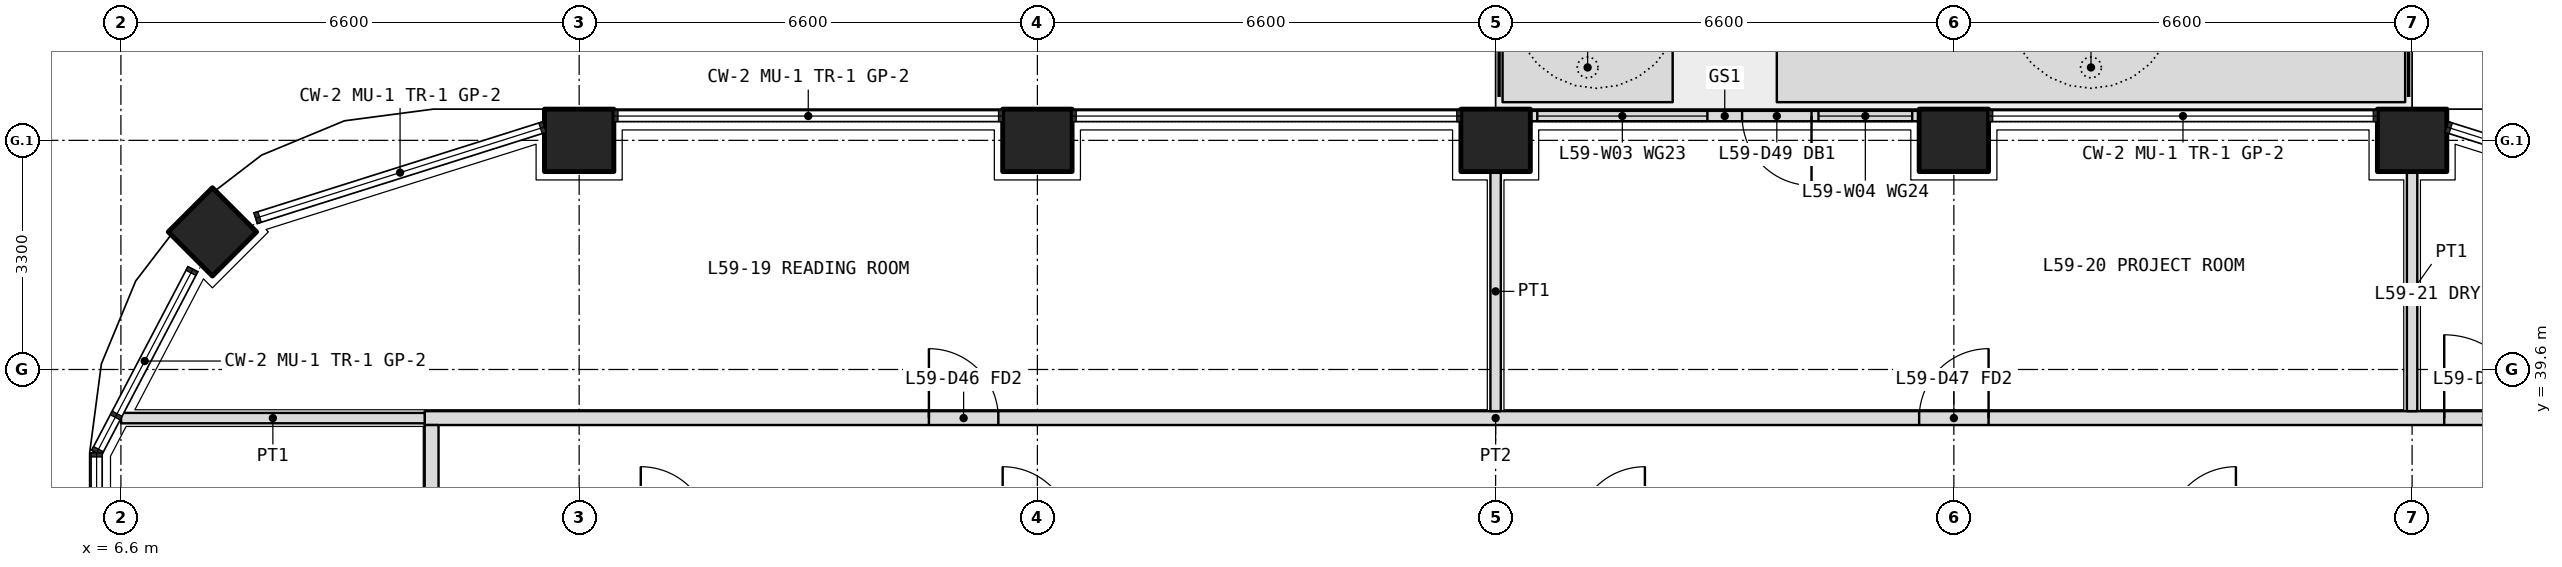
"""IFC4 building model, lengths in metres.
Left out: names, types, materials, properties, quantities, classifications, styles, units other than length and angle.
Written with IfcOpenShell. Run it as: python <this file> out.ifc"""

import sys

from ifc_helpers import new_model, si_unit, direction, frame, frame_2d, origin, origin_2d, place, context, subcontext, project, spatial, polyline, rectangle, outline, extrude, element, fill, save


model = new_model("IFC4")
c1 = context("Model", 3, precision=1e-05, world=origin(), true_north=direction((0.0, 1.0)))
c2 = subcontext(c1, "Body", "Model", "MODEL_VIEW")
j1 = project(units=[si_unit("LENGTHUNIT", "METRE"), si_unit("PLANEANGLEUNIT", "RADIAN")], contexts=[c1])
p1 = place(None, origin())
s1 = spatial("IfcSite", under=j1, at=p1, CompositionType="ELEMENT")
p2 = place(p1, origin())
s2 = spatial("IfcBuilding", under=s1, at=p2, CompositionType="ELEMENT")
p3 = place(p2, frame((0.0, 0.0, 258.6)))
s3 = spatial("IfcBuildingStorey", under=s2, at=p3, CompositionType="ELEMENT", Elevation=258.6)
p4 = place(p3, frame((7.918, 41.582, 0.0), z_axis=(0.0, 0.0, 1.0), x_axis=(0.707106781187, 0.707106781187, 0.0)))
e1 = element("IfcColumn", 1, at=p4, inside=s3, PredefinedType="COLUMN", context=c2, shape_type="SweptSolid", body=[
    extrude(rectangle(XDim=0.9, YDim=0.9, at=origin_2d()), origin(), (0.0, 0.0, 1.0), 4.2),
])
for number, where, z_axis, x_axis in (
    (2, (13.2, 42.9, 0.0), (0.0, 0.0, 1.0), (1.0, 0.0, 0.0)),
    (3, (19.8, 42.9, 0.0), (0.0, 0.0, 1.0), (1.0, 0.0, 0.0)),
    (4, (26.4, 42.9, 0.0), (0.0, 0.0, 1.0), (1.0, 0.0, 0.0)),
    (5, (33.0, 42.9, 0.0), (0.0, 0.0, 1.0), (1.0, 0.0, 0.0)),
    (6, (39.6, 42.9, 0.0), (0.0, 0.0, 1.0), (1.0, 0.0, 0.0)),
):
    element("IfcColumn", number, at=place(p3, frame(where, z_axis=z_axis, x_axis=x_axis)), inside=s3, PredefinedType="COLUMN", context=c2, shape_type="SweptSolid", body=[
        extrude(rectangle(XDim=1.0, YDim=0.9, at=origin_2d()), origin(), (0.0, 0.0, 1.0), 4.2),
    ])
p5 = place(p3, origin())
e7 = element("IfcWall", 7, at=p5, inside=s3, PredefinedType="USERDEFINED", context=c2, shape_type="SweptSolid", body=[
    extrude(outline(polyline([(26.5, 43.45), (28.95, 43.45), (28.95, 44.45), (26.5, 44.45), (26.5, 43.45)]), holes=[polyline([(26.65, 43.6), (28.8, 43.6), (28.8, 44.3), (26.65, 44.3), (26.65, 43.6)])]), origin(), (0.0, 0.0, 1.0), 1.05),
])
p6 = place(p3, origin())
e8 = element("IfcWall", 8, at=p6, inside=s3, PredefinedType="USERDEFINED", context=c2, shape_type="SweptSolid", body=[
    extrude(outline(polyline([(30.45, 43.45), (39.5, 43.45), (39.5, 44.45), (30.45, 44.45), (30.45, 43.45)]), holes=[polyline([(30.6, 43.6), (39.35, 43.6), (39.35, 44.3), (30.6, 44.3), (30.6, 43.6)])]), origin(), (0.0, 0.0, 1.0), 1.05),
])
p7 = place(p3, frame((32.5, 43.25, 0.0), z_axis=(0.0, 0.0, 1.0), x_axis=(-1.0, 0.0, 0.0)))
e9 = element("IfcWall", 9, at=p7, inside=s3, PredefinedType="SOLIDWALL", context=c2, shape_type="SweptSolid", body=[
    extrude(rectangle(XDim=5.6, YDim=0.15, at=frame_2d((2.8, 0.0))), origin(), (0.0, 0.0, 1.0), 2.7),
])
p8 = place(p7, frame((1.55, 0.0, 0.0)))
e10 = element("IfcOpeningElement", 10, at=p8, cuts=e9, PredefinedType="OPENING", context=c2, shape_type="SweptSolid", body=[
    extrude(rectangle(XDim=1.0, YDim=2.4, at=frame_2d((0.5, 1.2))), frame((0.0, 0.085, 0.0), z_axis=(0.0, -1.0, 0.0), x_axis=(1.0, 0.0, 0.0)), (0.0, 0.0, 1.0), 0.17),
])
p9 = place(p7, frame((0.1, 0.0, 0.1)))
e11 = element("IfcOpeningElement", 11, at=p9, cuts=e9, PredefinedType="OPENING", context=c2, shape_type="SweptSolid", body=[
    extrude(rectangle(XDim=1.35, YDim=2.3, at=frame_2d((0.675, 1.15))), frame((0.0, 0.085, 0.0), z_axis=(0.0, -1.0, 0.0), x_axis=(1.0, 0.0, 0.0)), (0.0, 0.0, 1.0), 0.17),
])
p10 = place(p7, frame((3.05, 0.0, 0.1)))
e12 = element("IfcOpeningElement", 12, at=p10, cuts=e9, PredefinedType="OPENING", context=c2, shape_type="SweptSolid", body=[
    extrude(rectangle(XDim=2.45, YDim=2.3, at=frame_2d((1.225, 1.15))), frame((0.0, 0.085, 0.0), z_axis=(0.0, -1.0, 0.0), x_axis=(1.0, 0.0, 0.0)), (0.0, 0.0, 1.0), 0.17),
])
p11 = place(p3, frame((10.975, 38.9, 0.0), z_axis=(0.0, 0.0, 1.0), x_axis=(1.0, 0.0, 0.0)))
e13 = element("IfcWall", 13, at=p11, inside=s3, PredefinedType="PARTITIONING", context=c2, shape_type="SweptSolid", body=[
    extrude(rectangle(XDim=30.85, YDim=0.2, at=frame_2d((15.425, 0.0))), origin(), (0.0, 0.0, 1.0), 3.0),
])
p12 = place(p11, frame((7.262, 0.0, 0.0)))
e14 = element("IfcOpeningElement", 14, at=p12, cuts=e13, PredefinedType="OPENING", context=c2, shape_type="SweptSolid", body=[
    extrude(rectangle(XDim=1.0, YDim=2.1, at=frame_2d((0.5, 1.05))), frame((0.0, 0.11, 0.0), z_axis=(0.0, -1.0, 0.0), x_axis=(1.0, 0.0, 0.0)), (0.0, 0.0, 1.0), 0.22),
])
p13 = place(p11, frame((21.525, 0.0, 0.0)))
e15 = element("IfcOpeningElement", 15, at=p13, cuts=e13, PredefinedType="OPENING", context=c2, shape_type="SweptSolid", body=[
    extrude(rectangle(XDim=1.0, YDim=2.1, at=frame_2d((0.5, 1.05))), frame((0.0, 0.11, 0.0), z_axis=(0.0, -1.0, 0.0), x_axis=(1.0, 0.0, 0.0)), (0.0, 0.0, 1.0), 0.22),
])
p14 = place(p11, frame((29.087, 0.0, 0.0)))
e16 = element("IfcOpeningElement", 16, at=p14, cuts=e13, PredefinedType="OPENING", context=c2, shape_type="SweptSolid", body=[
    extrude(rectangle(XDim=1.2, YDim=2.1, at=frame_2d((0.6, 1.05))), frame((0.0, 0.11, 0.0), z_axis=(0.0, -1.0, 0.0), x_axis=(1.0, 0.0, 0.0)), (0.0, 0.0, 1.0), 0.22),
])
p15 = place(p3, frame((11.075, 7.4, 0.0), z_axis=(0.0, 0.0, 1.0), x_axis=(0.0, 1.0, 0.0)))
e17 = element("IfcWall", 17, at=p15, inside=s3, PredefinedType="PARTITIONING", context=c2, shape_type="SweptSolid", body=[
    extrude(rectangle(XDim=31.4, YDim=0.2, at=frame_2d((15.7, 0.0))), origin(), (0.0, 0.0, 1.0), 3.0),
])
p16 = place(p15, frame((2.25, 0.0, 0.0)))
e18 = element("IfcOpeningElement", 18, at=p16, cuts=e17, PredefinedType="OPENING", context=c2, shape_type="SweptSolid", body=[
    extrude(rectangle(XDim=1.2, YDim=2.1, at=frame_2d((0.6, 1.05))), frame((0.0, 0.11, 0.0), z_axis=(0.0, -1.0, 0.0), x_axis=(1.0, 0.0, 0.0)), (0.0, 0.0, 1.0), 0.22),
])
p17 = place(p15, frame((6.35, 0.0, 0.0)))
e19 = element("IfcOpeningElement", 19, at=p17, cuts=e17, PredefinedType="OPENING", context=c2, shape_type="SweptSolid", body=[
    extrude(rectangle(XDim=1.0, YDim=2.1, at=frame_2d((0.5, 1.05))), frame((0.0, 0.11, 0.0), z_axis=(0.0, -1.0, 0.0), x_axis=(1.0, 0.0, 0.0)), (0.0, 0.0, 1.0), 0.22),
])
p18 = place(p15, frame((9.45, 0.0, 0.0)))
e20 = element("IfcOpeningElement", 20, at=p18, cuts=e17, PredefinedType="OPENING", context=c2, shape_type="SweptSolid", body=[
    extrude(rectangle(XDim=0.9, YDim=2.1, at=frame_2d((0.45, 1.05))), frame((0.0, 0.11, 0.0), z_axis=(0.0, -1.0, 0.0), x_axis=(1.0, 0.0, 0.0)), (0.0, 0.0, 1.0), 0.22),
])
p19 = place(p15, frame((13.35, 0.0, 0.0)))
e21 = element("IfcOpeningElement", 21, at=p19, cuts=e17, PredefinedType="OPENING", context=c2, shape_type="SweptSolid", body=[
    extrude(rectangle(XDim=0.9, YDim=2.1, at=frame_2d((0.45, 1.05))), frame((0.0, 0.11, 0.0), z_axis=(0.0, -1.0, 0.0), x_axis=(1.0, 0.0, 0.0)), (0.0, 0.0, 1.0), 0.22),
])
p20 = place(p15, frame((16.85, 0.0, 0.0)))
e22 = element("IfcOpeningElement", 22, at=p20, cuts=e17, PredefinedType="OPENING", context=c2, shape_type="SweptSolid", body=[
    extrude(rectangle(XDim=1.0, YDim=2.1, at=frame_2d((0.5, 1.05))), frame((0.0, 0.11, 0.0), z_axis=(0.0, -1.0, 0.0), x_axis=(1.0, 0.0, 0.0)), (0.0, 0.0, 1.0), 0.22),
])
p21 = place(p15, frame((24.75, 0.0, 0.0)))
e23 = element("IfcOpeningElement", 23, at=p21, cuts=e17, PredefinedType="OPENING", context=c2, shape_type="SweptSolid", body=[
    extrude(rectangle(XDim=1.0, YDim=2.1, at=frame_2d((0.5, 1.05))), frame((0.0, 0.11, 0.0), z_axis=(0.0, -1.0, 0.0), x_axis=(1.0, 0.0, 0.0)), (0.0, 0.0, 1.0), 0.22),
])
p22 = place(p3, frame((6.603, 38.9, 0.0), z_axis=(0.0, 0.0, 1.0), x_axis=(1.0, 0.0, 0.0)))
e24 = element("IfcWall", 24, at=p22, inside=s3, PredefinedType="PARTITIONING", context=c2, shape_type="SweptSolid", body=[
    extrude(rectangle(XDim=4.373, YDim=0.15, at=frame_2d((2.186, 0.0))), origin(), (0.0, 0.0, 1.0), 2.7),
])
for number, where, z_axis, x_axis in (
    (25, (26.4, 42.45, 0.0), (0.0, 0.0, 1.0), (0.0, -1.0, 0.0)),
    (26, (39.6, 42.45, 0.0), (0.0, 0.0, 1.0), (0.0, -1.0, 0.0)),
):
    element("IfcWall", number, at=place(p3, frame(where, z_axis=z_axis, x_axis=x_axis)), inside=s3, PredefinedType="PARTITIONING", context=c2, shape_type="SweptSolid", body=[
        extrude(rectangle(XDim=3.45, YDim=0.15, at=frame_2d((1.725, 0.0))), origin(), (0.0, 0.0, 1.0), 3.0),
    ])
p23 = place(p8, origin())
e27 = element("IfcDoor", 27, at=p23, inside=s3, OperationType="SINGLE_SWING_LEFT", PredefinedType="DOOR", context=c2, shape_type="SweptSolid", body=[
    extrude(rectangle(XDim=1.0, YDim=2.4, at=frame_2d((0.5, 1.2))), frame((0.0, 0.025, 0.0), z_axis=(0.0, -1.0, 0.0), x_axis=(1.0, 0.0, 0.0)), (0.0, 0.0, 1.0), 0.05),
])
fill(e10, e27)
p24 = place(p9, origin())
e28 = element("IfcWindow", 28, at=p24, inside=s3, PartitioningType="SINGLE_PANEL", PredefinedType="WINDOW", context=c2, shape_type="SweptSolid", body=[
    extrude(rectangle(XDim=1.35, YDim=2.3, at=frame_2d((0.675, 1.15))), frame((0.0, 0.03, 0.0), z_axis=(0.0, -1.0, 0.0), x_axis=(1.0, 0.0, 0.0)), (0.0, 0.0, 1.0), 0.06),
])
fill(e11, e28)
p25 = place(p10, origin())
e29 = element("IfcWindow", 29, at=p25, inside=s3, PartitioningType="SINGLE_PANEL", PredefinedType="WINDOW", context=c2, shape_type="SweptSolid", body=[
    extrude(rectangle(XDim=2.45, YDim=2.3, at=frame_2d((1.225, 1.15))), frame((0.0, 0.03, 0.0), z_axis=(0.0, -1.0, 0.0), x_axis=(1.0, 0.0, 0.0)), (0.0, 0.0, 1.0), 0.06),
])
fill(e12, e29)
p26 = place(p12, origin())
e30 = element("IfcDoor", 30, at=p26, inside=s3, OperationType="SINGLE_SWING_LEFT", PredefinedType="DOOR", context=c2, shape_type="SweptSolid", body=[
    extrude(rectangle(XDim=1.0, YDim=2.1, at=frame_2d((0.5, 1.05))), frame((0.0, 0.025, 0.0), z_axis=(0.0, -1.0, 0.0), x_axis=(1.0, 0.0, 0.0)), (0.0, 0.0, 1.0), 0.05),
])
fill(e14, e30)
p27 = place(p13, origin())
e31 = element("IfcDoor", 31, at=p27, inside=s3, OperationType="SINGLE_SWING_RIGHT", PredefinedType="DOOR", context=c2, shape_type="SweptSolid", body=[
    extrude(rectangle(XDim=1.0, YDim=2.1, at=frame_2d((0.5, 1.05))), frame((0.0, 0.025, 0.0), z_axis=(0.0, -1.0, 0.0), x_axis=(1.0, 0.0, 0.0)), (0.0, 0.0, 1.0), 0.05),
])
fill(e15, e31)
p28 = place(p14, origin())
e32 = element("IfcDoor", 32, at=p28, inside=s3, OperationType="DOUBLE_DOOR_SINGLE_SWING", PredefinedType="DOOR", context=c2, shape_type="SweptSolid", body=[
    extrude(rectangle(XDim=1.2, YDim=2.1, at=frame_2d((0.6, 1.05))), frame((0.0, 0.025, 0.0), z_axis=(0.0, -1.0, 0.0), x_axis=(1.0, 0.0, 0.0)), (0.0, 0.0, 1.0), 0.05),
])
fill(e16, e32)
save(model, sys.argv[1])
